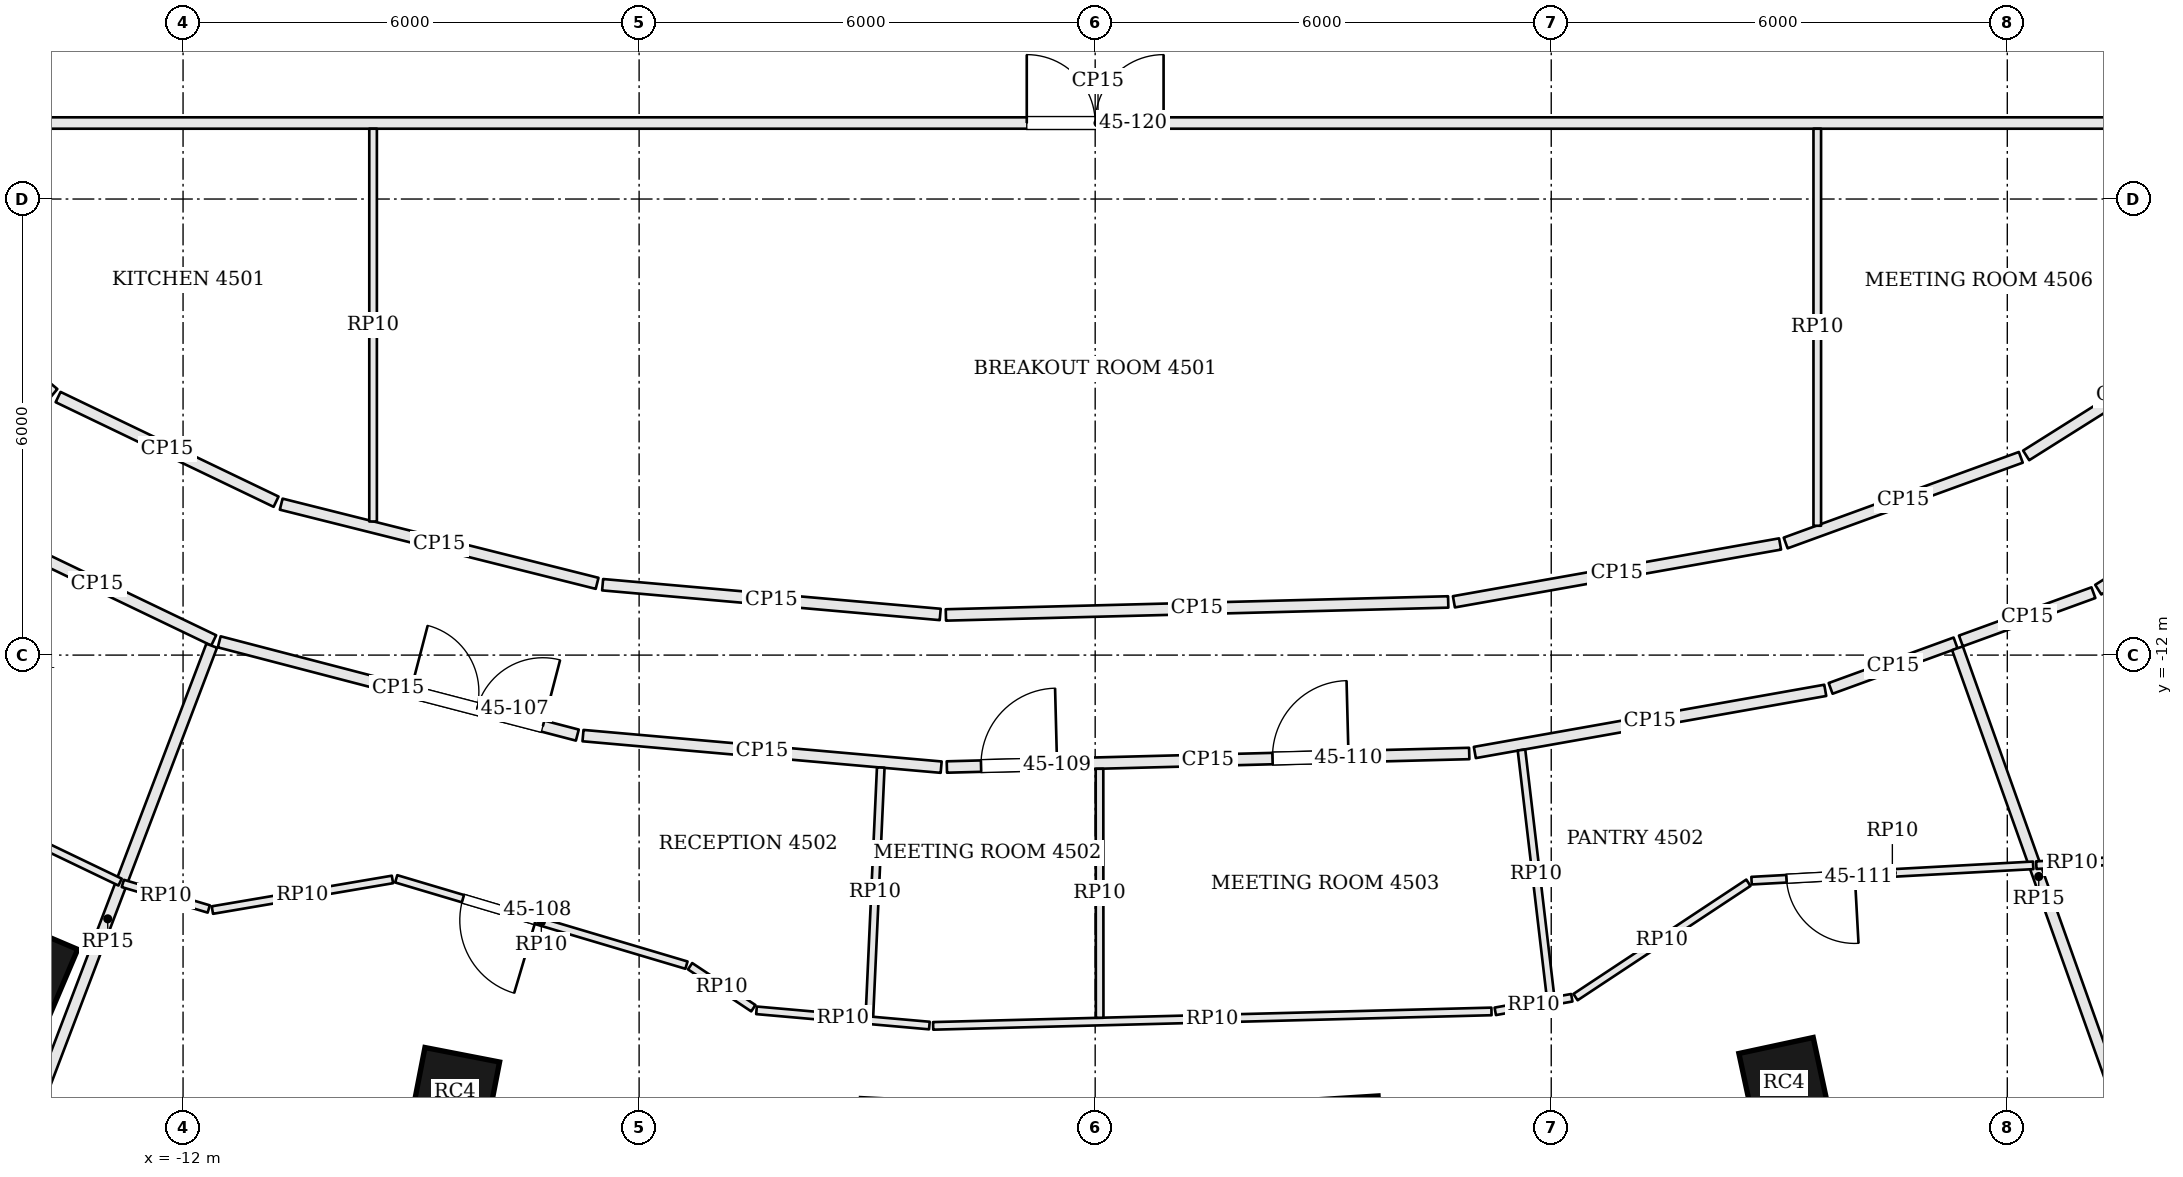
"""IFC4 building model, lengths in metres.
Left out: names, types, materials, properties, quantities, classifications, styles, units other than length and angle.
Written with IfcOpenShell. Run it as: python <this file> out.ifc"""

import sys

from ifc_helpers import new_model, si_unit, direction, frame, frame_2d, origin, origin_2d, place, context, subcontext, project, spatial, rectangle, extrude, element, fill, save


model = new_model("IFC4")
c1 = context("Model", 3, precision=1e-05, world=origin(), true_north=direction((0.0, 1.0)))
c2 = subcontext(c1, "Body", "Model", "MODEL_VIEW")
j1 = project(units=[si_unit("LENGTHUNIT", "METRE"), si_unit("PLANEANGLEUNIT", "RADIAN")], contexts=[c1])
p1 = place(None, origin())
s1 = spatial("IfcSite", under=j1, at=p1, CompositionType="ELEMENT")
p2 = place(p1, origin())
s2 = spatial("IfcBuilding", under=s1, at=p2, CompositionType="ELEMENT")
p3 = place(p2, frame((0.0, 0.0, 185.7)))
s3 = spatial("IfcBuildingStorey", under=s2, at=p3, CompositionType="ELEMENT", Elevation=185.7)
for number, where, z_axis, x_axis in (
    (1, (-14.042, -16.136, 0.0), (0.0, 0.0, 1.0), (0.92, -0.392, 0.0)),
    (2, (-8.422, -17.749, 0.0), (0.0, 0.0, 1.0), (0.982, -0.191, 0.0)),
    (3, (3.254, -18.33, 0.0), (0.0, 0.0, 1.0), (0.998, 0.063, 0.0)),
    (4, (9.063, -17.625, 0.0), (0.0, 0.0, 1.0), (0.978, 0.21, 0.0)),
):
    element("IfcColumn", number, at=place(p3, frame(where, z_axis=z_axis, x_axis=x_axis)), inside=s3, PredefinedType="COLUMN", context=c2, shape_type="SweptSolid", body=[
        extrude(rectangle(XDim=1.0, YDim=1.0, at=origin_2d()), origin(), (0.0, 0.0, 1.0), 3.9),
    ])
p4 = place(p3, frame((-14.664, -10.334, 0.0), z_axis=(0.0, 0.0, 1.0), x_axis=(0.901500664489, -0.43277771653, 0.0)))
e5 = element("IfcWall", 5, at=p4, inside=s3, PredefinedType="PARTITIONING", context=c2, shape_type="SweptSolid", body=[
    extrude(rectangle(XDim=3.403, YDim=0.15, at=frame_2d((1.701, 0.0))), origin(), (0.0, 0.0, 1.0), 3.084),
])
p5 = place(p3, frame((-14.359, -19.063, 0.0), z_axis=(0.0, 0.0, 1.0), x_axis=(0.355747085176, 0.934582265715, 0.0)))
e6 = element("IfcWall", 6, at=p5, inside=s3, PredefinedType="PARTITIONING", context=c2, shape_type="SweptSolid", body=[
    extrude(rectangle(XDim=7.689, YDim=0.15, at=frame_2d((3.844, 0.0))), origin(), (0.0, 0.0, 1.0), 3.084),
])
p6 = place(p3, frame((-11.524, -11.825, 0.0), z_axis=(0.0, 0.0, 1.0), x_axis=(0.967712002698, -0.252058484948, 0.0)))
e7 = element("IfcWall", 7, at=p6, inside=s3, PredefinedType="PARTITIONING", context=c2, shape_type="SweptSolid", body=[
    extrude(rectangle(XDim=4.868, YDim=0.15, at=frame_2d((2.434, 0.0))), origin(), (0.0, 0.0, 1.0), 3.084),
])
p7 = place(p6, frame((2.6, 0.0, 0.0)))
e8 = element("IfcOpeningElement", 8, at=p7, cuts=e7, PredefinedType="OPENING", context=c2, shape_type="SweptSolid", body=[
    extrude(rectangle(XDim=1.8, YDim=2.1, at=frame_2d((0.9, 1.05))), frame((0.0, 0.085, 0.0), z_axis=(0.0, -1.0, 0.0), x_axis=(1.0, 0.0, 0.0)), (0.0, 0.0, 1.0), 0.17),
])
p8 = place(p3, frame((-6.738, -13.059, 0.0), z_axis=(0.0, 0.0, 1.0), x_axis=(0.996143527037, -0.087738666181, 0.0)))
e9 = element("IfcWall", 9, at=p8, inside=s3, PredefinedType="PARTITIONING", context=c2, shape_type="SweptSolid", body=[
    extrude(rectangle(XDim=4.73, YDim=0.15, at=frame_2d((2.365, 0.0))), origin(), (0.0, 0.0, 1.0), 3.084),
])
p9 = place(p3, frame((-1.951, -13.472, 0.0), z_axis=(0.0, 0.0, 1.0), x_axis=(0.999663898238, 0.025924709429, 0.0)))
e10 = element("IfcWall", 10, at=p9, inside=s3, PredefinedType="PARTITIONING", context=c2, shape_type="SweptSolid", body=[
    extrude(rectangle(XDim=6.875, YDim=0.15, at=frame_2d((3.437, 0.0))), origin(), (0.0, 0.0, 1.0), 3.084),
])
p10 = place(p9, frame((0.45, 0.0, 0.0)))
e11 = element("IfcOpeningElement", 11, at=p10, cuts=e10, PredefinedType="OPENING", context=c2, shape_type="SweptSolid", body=[
    extrude(rectangle(XDim=1.0, YDim=2.4, at=frame_2d((0.5, 1.2))), frame((0.0, 0.085, 0.0), z_axis=(0.0, -1.0, 0.0), x_axis=(1.0, 0.0, 0.0)), (0.0, 0.0, 1.0), 0.17),
])
p11 = place(p9, frame((4.286, 0.0, 0.0)))
e12 = element("IfcOpeningElement", 12, at=p11, cuts=e10, PredefinedType="OPENING", context=c2, shape_type="SweptSolid", body=[
    extrude(rectangle(XDim=1.0, YDim=2.4, at=frame_2d((0.5, 1.2))), frame((0.0, 0.085, 0.0), z_axis=(0.0, -1.0, 0.0), x_axis=(1.0, 0.0, 0.0)), (0.0, 0.0, 1.0), 0.17),
])
p12 = place(p3, frame((4.995, -13.281, 0.0), z_axis=(0.0, 0.0, 1.0), x_axis=(0.98463411377, 0.174630071865, 0.0)))
e13 = element("IfcWall", 13, at=p12, inside=s3, PredefinedType="PARTITIONING", context=c2, shape_type="SweptSolid", body=[
    extrude(rectangle(XDim=4.682, YDim=0.15, at=frame_2d((2.341, 0.0))), origin(), (0.0, 0.0, 1.0), 3.084),
])
p13 = place(p3, frame((9.676, -12.438, 0.0), z_axis=(0.0, 0.0, 1.0), x_axis=(0.939630331536, 0.342191233169, 0.0)))
e14 = element("IfcWall", 14, at=p13, inside=s3, PredefinedType="PARTITIONING", context=c2, shape_type="SweptSolid", body=[
    extrude(rectangle(XDim=1.75, YDim=0.15, at=frame_2d((0.875, 0.0))), origin(), (0.0, 0.0, 1.0), 3.084),
])
p14 = place(p3, frame((13.483, -17.916, 0.0), z_axis=(0.0, 0.0, 1.0), x_axis=(-0.33549690644, 0.942041307889, 0.0)))
e15 = element("IfcWall", 15, at=p14, inside=s3, PredefinedType="PARTITIONING", context=c2, shape_type="SweptSolid", body=[
    extrude(rectangle(XDim=6.375, YDim=0.15, at=frame_2d((3.188, 0.0))), origin(), (0.0, 0.0, 1.0), 3.084),
])
p15 = place(p3, frame((11.39, -11.814, 0.0), z_axis=(0.0, 0.0, 1.0), x_axis=(0.939639632456, 0.342165692491, 0.0)))
e16 = element("IfcWall", 16, at=p15, inside=s3, PredefinedType="PARTITIONING", context=c2, shape_type="SweptSolid", body=[
    extrude(rectangle(XDim=1.855, YDim=0.15, at=frame_2d((0.928, 0.0))), origin(), (0.0, 0.0, 1.0), 3.084),
])
p16 = place(p3, frame((13.197, -11.139, 0.0), z_axis=(0.0, 0.0, 1.0), x_axis=(0.846390903833, 0.532562144644, 0.0)))
e17 = element("IfcWall", 17, at=p16, inside=s3, PredefinedType="PARTITIONING", context=c2, shape_type="SweptSolid", body=[
    extrude(rectangle(XDim=3.481, YDim=0.15, at=frame_2d((1.741, 0.0))), origin(), (0.0, 0.0, 1.0), 3.084),
])
p17 = place(p16, frame((1.25, 0.0, 0.0)))
e18 = element("IfcOpeningElement", 18, at=p17, cuts=e17, PredefinedType="OPENING", context=c2, shape_type="SweptSolid", body=[
    extrude(rectangle(XDim=1.8, YDim=2.1, at=frame_2d((0.9, 1.05))), frame((0.0, 0.085, 0.0), z_axis=(0.0, -1.0, 0.0), x_axis=(1.0, 0.0, 0.0)), (0.0, 0.0, 1.0), 0.17),
])
p18 = place(p3, frame((14.777, -7.781, 0.0), z_axis=(0.0, 0.0, 1.0), x_axis=(-0.846359741043, -0.532611667862, 0.0)))
e19 = element("IfcWall", 19, at=p18, inside=s3, PredefinedType="PARTITIONING", context=c2, shape_type="SweptSolid", body=[
    extrude(rectangle(XDim=2.987, YDim=0.15, at=frame_2d((1.494, 0.0))), origin(), (0.0, 0.0, 1.0), 3.084),
])
p19 = place(p3, frame((12.178, -9.398, 0.0), z_axis=(0.0, 0.0, 1.0), x_axis=(-0.939609240084, -0.342249143093, 0.0)))
e20 = element("IfcWall", 20, at=p19, inside=s3, PredefinedType="PARTITIONING", context=c2, shape_type="SweptSolid", body=[
    extrude(rectangle(XDim=3.292, YDim=0.15, at=frame_2d((1.646, 0.0))), origin(), (0.0, 0.0, 1.0), 3.084),
])
p20 = place(p3, frame((9.01, -10.538, 0.0), z_axis=(0.0, 0.0, 1.0), x_axis=(-0.984645638575, -0.174565077936, 0.0)))
e21 = element("IfcWall", 21, at=p20, inside=s3, PredefinedType="PARTITIONING", context=c2, shape_type="SweptSolid", body=[
    extrude(rectangle(XDim=4.358, YDim=0.15, at=frame_2d((2.179, 0.0))), origin(), (0.0, 0.0, 1.0), 3.084),
])
p21 = place(p3, frame((4.645, -11.301, 0.0), z_axis=(0.0, 0.0, 1.0), x_axis=(-0.9996648469, -0.02588810291, 0.0)))
e22 = element("IfcWall", 22, at=p21, inside=s3, PredefinedType="PARTITIONING", context=c2, shape_type="SweptSolid", body=[
    extrude(rectangle(XDim=6.611, YDim=0.15, at=frame_2d((3.305, 0.0))), origin(), (0.0, 0.0, 1.0), 3.084),
])
p22 = place(p3, frame((-2.039, -11.465, 0.0), z_axis=(0.0, 0.0, 1.0), x_axis=(-0.996139855484, 0.087780341286, 0.0)))
e23 = element("IfcWall", 23, at=p22, inside=s3, PredefinedType="PARTITIONING", context=c2, shape_type="SweptSolid", body=[
    extrude(rectangle(XDim=4.458, YDim=0.15, at=frame_2d((2.229, 0.0))), origin(), (0.0, 0.0, 1.0), 3.084),
])
p23 = place(p3, frame((-6.553, -11.056, 0.0), z_axis=(0.0, 0.0, 1.0), x_axis=(-0.970004917182, 0.243085294995, 0.0)))
e24 = element("IfcWall", 24, at=p23, inside=s3, PredefinedType="PARTITIONING", context=c2, shape_type="SweptSolid", body=[
    extrude(rectangle(XDim=4.284, YDim=0.15, at=frame_2d((2.142, 0.0))), origin(), (0.0, 0.0, 1.0), 3.084),
])
p24 = place(p3, frame((-10.776, -9.982, 0.0), z_axis=(0.0, 0.0, 1.0), x_axis=(-0.901511079436, 0.432756020933, 0.0)))
e25 = element("IfcWall", 25, at=p24, inside=s3, PredefinedType="PARTITIONING", context=c2, shape_type="SweptSolid", body=[
    extrude(rectangle(XDim=3.181, YDim=0.15, at=frame_2d((1.59, 0.0))), origin(), (0.0, 0.0, 1.0), 3.084),
])
p25 = place(p3, frame((-13.702, -8.557, 0.0), z_axis=(0.0, 0.0, 1.0), x_axis=(-0.769221825067, 0.638981833733, 0.0)))
e26 = element("IfcWall", 26, at=p25, inside=s3, PredefinedType="PARTITIONING", context=c2, shape_type="SweptSolid", body=[
    extrude(rectangle(XDim=2.817, YDim=0.15, at=frame_2d((1.409, 0.0))), origin(), (0.0, 0.0, 1.0), 3.084),
])
p26 = place(p3, frame((-14.925, -5.0, 0.0), z_axis=(0.0, 0.0, 1.0), x_axis=(1.0, 0.0, 0.0)))
e27 = element("IfcWall", 27, at=p26, inside=s3, PredefinedType="PARTITIONING", context=c2, shape_type="SweptSolid", body=[
    extrude(rectangle(XDim=29.925, YDim=0.15, at=frame_2d((14.962, 0.0))), origin(), (0.0, 0.0, 1.0), 3.084),
])
p27 = place(p26, frame((14.025, 0.0, 0.0)))
e28 = element("IfcOpeningElement", 28, at=p27, cuts=e27, PredefinedType="OPENING", context=c2, shape_type="SweptSolid", body=[
    extrude(rectangle(XDim=1.8, YDim=2.1, at=frame_2d((0.9, 1.05))), frame((0.0, 0.085, 0.0), z_axis=(0.0, -1.0, 0.0), x_axis=(1.0, 0.0, 0.0)), (0.0, 0.0, 1.0), 0.17),
])
p28 = place(p3, frame((-12.829, -14.987, 0.0), z_axis=(0.0, 0.0, 1.0), x_axis=(-0.901501094212, 0.432776821393, 0.0)))
e29 = element("IfcWall", 29, at=p28, inside=s3, PredefinedType="PARTITIONING", context=c2, shape_type="SweptSolid", body=[
    extrude(rectangle(XDim=4.163, YDim=0.1, at=frame_2d((2.082, 0.0))), origin(), (0.0, 0.0, 1.0), 3.084),
])
p29 = place(p28, frame((2.612, 0.0, 0.0)))
e30 = element("IfcOpeningElement", 30, at=p29, cuts=e29, PredefinedType="OPENING", context=c2, shape_type="SweptSolid", body=[
    extrude(rectangle(XDim=0.9, YDim=2.1, at=frame_2d((0.45, 1.05))), frame((0.0, 0.06, 0.0), z_axis=(0.0, -1.0, 0.0), x_axis=(1.0, 0.0, 0.0)), (0.0, 0.0, 1.0), 0.12),
])
p30 = place(p3, frame((12.34, -14.766, 0.0), z_axis=(0.0, 0.0, 1.0), x_axis=(-0.998525257467, -0.054289135192, 0.0)))
e31 = element("IfcWall", 31, at=p30, inside=s3, PredefinedType="PARTITIONING", context=c2, shape_type="SweptSolid", body=[
    extrude(rectangle(XDim=3.71, YDim=0.1, at=frame_2d((1.855, 0.0))), origin(), (0.0, 0.0, 1.0), 3.084),
])
p31 = place(p30, frame((2.35, 0.0, 0.0)))
e32 = element("IfcOpeningElement", 32, at=p31, cuts=e31, PredefinedType="OPENING", context=c2, shape_type="SweptSolid", body=[
    extrude(rectangle(XDim=0.9, YDim=2.1, at=frame_2d((0.45, 1.05))), frame((0.0, 0.06, 0.0), z_axis=(0.0, -1.0, 0.0), x_axis=(1.0, 0.0, 0.0)), (0.0, 0.0, 1.0), 0.12),
])
p32 = place(p3, frame((8.594, -14.995, 0.0), z_axis=(0.0, 0.0, 1.0), x_axis=(-0.834069742789, -0.55165901077, 0.0)))
e33 = element("IfcWall", 33, at=p32, inside=s3, PredefinedType="PARTITIONING", context=c2, shape_type="SweptSolid", body=[
    extrude(rectangle(XDim=2.727, YDim=0.1, at=frame_2d((1.363, 0.0))), origin(), (0.0, 0.0, 1.0), 3.084),
])
p33 = place(p3, frame((6.271, -16.508, 0.0), z_axis=(0.0, 0.0, 1.0), x_axis=(-0.984643798133, -0.174575458752, 0.0)))
e34 = element("IfcWall", 34, at=p33, inside=s3, PredefinedType="PARTITIONING", context=c2, shape_type="SweptSolid", body=[
    extrude(rectangle(XDim=1.022, YDim=0.1, at=frame_2d((0.511, 0.0))), origin(), (0.0, 0.0, 1.0), 3.084),
])
p34 = place(p3, frame((5.214, -16.688, 0.0), z_axis=(0.0, 0.0, 1.0), x_axis=(-0.999664981446, -0.025882906921, 0.0)))
e35 = element("IfcWall", 35, at=p34, inside=s3, PredefinedType="PARTITIONING", context=c2, shape_type="SweptSolid", body=[
    extrude(rectangle(XDim=7.348, YDim=0.1, at=frame_2d((3.674, 0.0))), origin(), (0.0, 0.0, 1.0), 3.084),
])
p35 = place(p3, frame((-2.181, -16.874, 0.0), z_axis=(0.0, 0.0, 1.0), x_axis=(-0.996147729226, 0.087690943421, 0.0)))
e36 = element("IfcWall", 36, at=p35, inside=s3, PredefinedType="PARTITIONING", context=c2, shape_type="SweptSolid", body=[
    extrude(rectangle(XDim=2.283, YDim=0.1, at=frame_2d((1.142, 0.0))), origin(), (0.0, 0.0, 1.0), 3.084),
])
p36 = place(p3, frame((-4.497, -16.646, 0.0), z_axis=(0.0, 0.0, 1.0), x_axis=(-0.832989458456, 0.55328885955, 0.0)))
e37 = element("IfcWall", 37, at=p36, inside=s3, PredefinedType="PARTITIONING", context=c2, shape_type="SweptSolid", body=[
    extrude(rectangle(XDim=0.999, YDim=0.1, at=frame_2d((0.499, 0.0))), origin(), (0.0, 0.0, 1.0), 3.084),
])
p37 = place(p3, frame((-5.377, -16.079, 0.0), z_axis=(0.0, 0.0, 1.0), x_axis=(-0.958503323659, 0.28508135424, 0.0)))
e38 = element("IfcWall", 38, at=p37, inside=s3, PredefinedType="PARTITIONING", context=c2, shape_type="SweptSolid", body=[
    extrude(rectangle(XDim=3.984, YDim=0.1, at=frame_2d((1.992, 0.0))), origin(), (0.0, 0.0, 1.0), 3.084),
])
p38 = place(p37, frame((2.068, 0.0, 0.0)))
e39 = element("IfcOpeningElement", 39, at=p38, cuts=e38, PredefinedType="OPENING", context=c2, shape_type="SweptSolid", body=[
    extrude(rectangle(XDim=1.0, YDim=2.1, at=frame_2d((0.5, 1.05))), frame((0.0, 0.06, 0.0), z_axis=(0.0, -1.0, 0.0), x_axis=(1.0, 0.0, 0.0)), (0.0, 0.0, 1.0), 0.12),
])
p39 = place(p3, frame((-9.245, -14.952, 0.0), z_axis=(0.0, 0.0, 1.0), x_axis=(-0.985850474782, -0.167627090209, 0.0)))
e40 = element("IfcWall", 40, at=p39, inside=s3, PredefinedType="PARTITIONING", context=c2, shape_type="SweptSolid", body=[
    extrude(rectangle(XDim=2.403, YDim=0.1, at=frame_2d((1.202, 0.0))), origin(), (0.0, 0.0, 1.0), 3.084),
])
p40 = place(p3, frame((-11.662, -15.34, 0.0), z_axis=(0.0, 0.0, 1.0), x_axis=(-0.95854705676, 0.284934273083, 0.0)))
e41 = element("IfcWall", 41, at=p40, inside=s3, PredefinedType="PARTITIONING", context=c2, shape_type="SweptSolid", body=[
    extrude(rectangle(XDim=1.179, YDim=0.1, at=frame_2d((0.589, 0.0))), origin(), (0.0, 0.0, 1.0), 3.084),
])
p41 = place(p3, frame((-2.821, -13.479, 0.0), z_axis=(0.0, 0.0, 1.0), x_axis=(-0.045509018784, -0.998963927882, 0.0)))
e42 = element("IfcWall", 42, at=p41, inside=s3, PredefinedType="PARTITIONING", context=c2, shape_type="SweptSolid", body=[
    extrude(rectangle(XDim=3.278, YDim=0.1, at=frame_2d((1.639, 0.0))), origin(), (0.0, 0.0, 1.0), 3.084),
])
p42 = place(p3, frame((0.057, -13.495, 0.0), z_axis=(0.0, 0.0, 1.0), x_axis=(0.000596213935, -0.999999822264, 0.0)))
e43 = element("IfcWall", 43, at=p42, inside=s3, PredefinedType="PARTITIONING", context=c2, shape_type="SweptSolid", body=[
    extrude(rectangle(XDim=3.276, YDim=0.1, at=frame_2d((1.638, 0.0))), origin(), (0.0, 0.0, 1.0), 3.084),
])
p43 = place(p3, frame((5.609, -13.248, 0.0), z_axis=(0.0, 0.0, 1.0), x_axis=(0.116906011252, -0.993142982925, 0.0)))
e44 = element("IfcWall", 44, at=p43, inside=s3, PredefinedType="PARTITIONING", context=c2, shape_type="SweptSolid", body=[
    extrude(rectangle(XDim=3.281, YDim=0.1, at=frame_2d((1.64, 0.0))), origin(), (0.0, 0.0, 1.0), 3.084),
])
p44 = place(p3, frame((13.324, -14.712, 0.0), z_axis=(0.0, 0.0, 1.0), x_axis=(-0.998522607903, -0.054337845986, 0.0)))
e45 = element("IfcWall", 45, at=p44, inside=s3, PredefinedType="PARTITIONING", context=c2, shape_type="SweptSolid", body=[
    extrude(rectangle(XDim=0.944, YDim=0.1, at=frame_2d((0.472, 0.0))), origin(), (0.0, 0.0, 1.0), 3.084),
])
p45 = place(p3, frame((-9.5, -10.242, 0.0), z_axis=(0.0, 0.0, 1.0), x_axis=(0.0, 1.0, 0.0)))
e46 = element("IfcWall", 46, at=p45, inside=s3, PredefinedType="PARTITIONING", context=c2, shape_type="SweptSolid", body=[
    extrude(rectangle(XDim=5.167, YDim=0.1, at=frame_2d((2.583, 0.0))), origin(), (0.0, 0.0, 1.0), 3.084),
])
p46 = place(p3, frame((9.5, -10.299, 0.0), z_axis=(0.0, 0.0, 1.0), x_axis=(0.0, 1.0, 0.0)))
e47 = element("IfcWall", 47, at=p46, inside=s3, PredefinedType="PARTITIONING", context=c2, shape_type="SweptSolid", body=[
    extrude(rectangle(XDim=5.224, YDim=0.1, at=frame_2d((2.612, 0.0))), origin(), (0.0, 0.0, 1.0), 3.084),
])
p47 = place(p7, origin())
e48 = element("IfcDoor", 48, at=p47, inside=s3, OperationType="DOUBLE_DOOR_SINGLE_SWING", PredefinedType="DOOR", context=c2, shape_type="SweptSolid", body=[
    extrude(rectangle(XDim=1.8, YDim=2.1, at=frame_2d((0.9, 1.05))), frame((0.0, 0.025, 0.0), z_axis=(0.0, -1.0, 0.0), x_axis=(1.0, 0.0, 0.0)), (0.0, 0.0, 1.0), 0.05),
])
fill(e8, e48)
p48 = place(p38, origin())
e49 = element("IfcDoor", 49, at=p48, inside=s3, OperationType="SINGLE_SWING_LEFT", PredefinedType="DOOR", context=c2, shape_type="SweptSolid", body=[
    extrude(rectangle(XDim=1.0, YDim=2.1, at=frame_2d((0.5, 1.05))), frame((0.0, 0.025, 0.0), z_axis=(0.0, -1.0, 0.0), x_axis=(1.0, 0.0, 0.0)), (0.0, 0.0, 1.0), 0.05),
])
fill(e39, e49)
p49 = place(p10, origin())
e50 = element("IfcDoor", 50, at=p49, inside=s3, OperationType="SINGLE_SWING_RIGHT", PredefinedType="DOOR", context=c2, shape_type="SweptSolid", body=[
    extrude(rectangle(XDim=1.0, YDim=2.4, at=frame_2d((0.5, 1.2))), frame((0.0, 0.025, 0.0), z_axis=(0.0, -1.0, 0.0), x_axis=(1.0, 0.0, 0.0)), (0.0, 0.0, 1.0), 0.05),
])
fill(e11, e50)
p50 = place(p11, origin())
e51 = element("IfcDoor", 51, at=p50, inside=s3, OperationType="SINGLE_SWING_RIGHT", PredefinedType="DOOR", context=c2, shape_type="SweptSolid", body=[
    extrude(rectangle(XDim=1.0, YDim=2.4, at=frame_2d((0.5, 1.2))), frame((0.0, 0.025, 0.0), z_axis=(0.0, -1.0, 0.0), x_axis=(1.0, 0.0, 0.0)), (0.0, 0.0, 1.0), 0.05),
])
fill(e12, e51)
p51 = place(p31, origin())
e52 = element("IfcDoor", 52, at=p51, inside=s3, OperationType="SINGLE_SWING_LEFT", PredefinedType="DOOR", context=c2, shape_type="SweptSolid", body=[
    extrude(rectangle(XDim=0.9, YDim=2.1, at=frame_2d((0.45, 1.05))), frame((0.0, 0.025, 0.0), z_axis=(0.0, -1.0, 0.0), x_axis=(1.0, 0.0, 0.0)), (0.0, 0.0, 1.0), 0.05),
])
fill(e32, e52)
p52 = place(p27, origin())
e53 = element("IfcDoor", 53, at=p52, inside=s3, OperationType="DOUBLE_DOOR_SINGLE_SWING", PredefinedType="DOOR", context=c2, shape_type="SweptSolid", body=[
    extrude(rectangle(XDim=1.8, YDim=2.1, at=frame_2d((0.9, 1.05))), frame((0.0, 0.025, 0.0), z_axis=(0.0, -1.0, 0.0), x_axis=(1.0, 0.0, 0.0)), (0.0, 0.0, 1.0), 0.05),
])
fill(e28, e53)
save(model, sys.argv[1])
